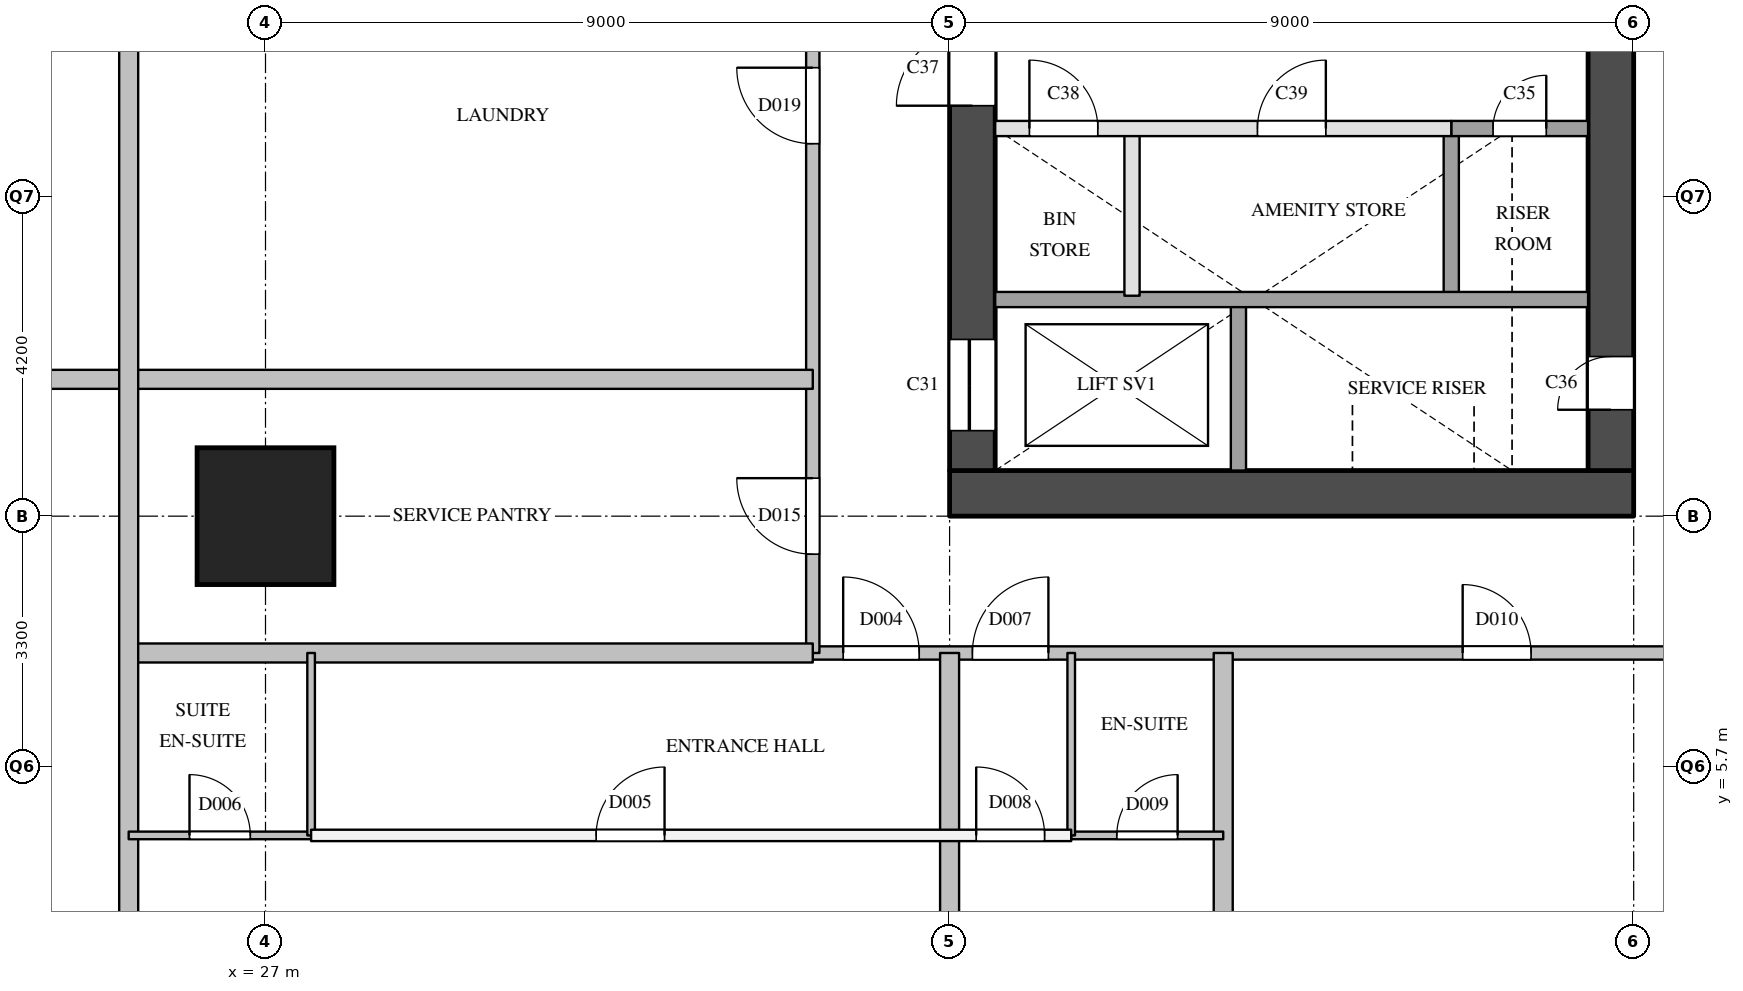
"""IFC4 building model, lengths in metres.
Left out: names, types, materials, properties, quantities, classifications, styles, units other than length and angle.
Written with IfcOpenShell. Run it as: python <this file> out.ifc"""

import sys

from ifc_helpers import new_model, si_unit, direction, frame, frame_2d, origin, origin_2d, place, context, subcontext, project, spatial, rectangle, extrude, element, fill, save


model = new_model("IFC4")
c1 = context("Model", 3, precision=1e-05, world=origin(), true_north=direction((0.0, 1.0)))
c2 = subcontext(c1, "Body", "Model", "MODEL_VIEW")
j1 = project(units=[si_unit("LENGTHUNIT", "METRE"), si_unit("PLANEANGLEUNIT", "RADIAN")], contexts=[c1])
p1 = place(None, origin())
s1 = spatial("IfcSite", under=j1, at=p1, CompositionType="ELEMENT")
p2 = place(p1, origin())
s2 = spatial("IfcBuilding", under=s1, at=p2, CompositionType="ELEMENT")
p3 = place(p2, frame((0.0, 0.0, 57.6)))
s3 = spatial("IfcBuildingStorey", under=s2, at=p3, CompositionType="ELEMENT", Elevation=57.6)
p4 = place(p3, frame((27.0, 9.0, 0.0), z_axis=(0.0, 0.0, 1.0), x_axis=(1.0, 0.0, 0.0)))
e1 = element("IfcColumn", 1, at=p4, inside=s3, PredefinedType="COLUMN", context=c2, shape_type="SweptSolid", body=[
    extrude(rectangle(XDim=1.8, YDim=1.8, at=origin_2d()), origin(), (0.0, 0.0, 1.0), 3.8),
])
p5 = place(p3, frame((36.0, 9.3, 0.0), z_axis=(0.0, 0.0, 1.0), x_axis=(1.0, 0.0, 0.0)))
e2 = element("IfcWall", 2, at=p5, inside=s3, PredefinedType="SHEAR", context=c2, shape_type="SweptSolid", body=[
    extrude(rectangle(XDim=9.0, YDim=0.6, at=frame_2d((4.5, 0.0))), origin(), (0.0, 0.0, 1.0), 3.5),
])
p6 = place(p3, frame((36.3, 9.6, 0.0), z_axis=(0.0, 0.0, 1.0), x_axis=(0.0, 1.0, 0.0)))
e3 = element("IfcWall", 3, at=p6, inside=s3, PredefinedType="SHEAR", context=c2, shape_type="SweptSolid", body=[
    extrude(rectangle(XDim=12.3, YDim=0.6, at=frame_2d((6.15, 0.0))), origin(), (0.0, 0.0, 1.0), 3.5),
])
p7 = place(p6, frame((0.525, 0.0, 0.0)))
e4 = element("IfcOpeningElement", 4, at=p7, cuts=e3, PredefinedType="OPENING", context=c2, shape_type="SweptSolid", body=[
    extrude(rectangle(XDim=1.2, YDim=2.1, at=frame_2d((0.6, 1.05))), frame((0.0, 0.31, 0.0), z_axis=(0.0, -1.0, 0.0), x_axis=(1.0, 0.0, 0.0)), (0.0, 0.0, 1.0), 0.62),
])
p8 = place(p6, frame((4.8, 0.0, 0.0)))
e5 = element("IfcOpeningElement", 5, at=p8, cuts=e3, PredefinedType="OPENING", context=c2, shape_type="SweptSolid", body=[
    extrude(rectangle(XDim=1.0, YDim=2.1, at=frame_2d((0.5, 1.05))), frame((0.0, 0.31, 0.0), z_axis=(0.0, -1.0, 0.0), x_axis=(1.0, 0.0, 0.0)), (0.0, 0.0, 1.0), 0.62),
])
p9 = place(p3, frame((44.7, 9.6, 0.0), z_axis=(0.0, 0.0, 1.0), x_axis=(0.0, 1.0, 0.0)))
e6 = element("IfcWall", 6, at=p9, inside=s3, PredefinedType="SHEAR", context=c2, shape_type="SweptSolid", body=[
    extrude(rectangle(XDim=12.3, YDim=0.6, at=frame_2d((6.15, 0.0))), origin(), (0.0, 0.0, 1.0), 3.5),
])
p10 = place(p9, frame((0.8, 0.0, 0.0)))
e7 = element("IfcOpeningElement", 7, at=p10, cuts=e6, PredefinedType="OPENING", context=c2, shape_type="SweptSolid", body=[
    extrude(rectangle(XDim=0.7, YDim=2.1, at=frame_2d((0.35, 1.05))), frame((0.0, 0.31, 0.0), z_axis=(0.0, -1.0, 0.0), x_axis=(1.0, 0.0, 0.0)), (0.0, 0.0, 1.0), 0.62),
])
p11 = place(p3, frame((38.4, 11.9, 0.0), z_axis=(0.0, 0.0, 1.0), x_axis=(0.0, 1.0, 0.0)))
e8 = element("IfcWall", 8, at=p11, inside=s3, PredefinedType="PARTITIONING", context=c2, shape_type="SweptSolid", body=[
    extrude(rectangle(XDim=2.2, YDim=0.2, at=frame_2d((1.1, 0.0))), origin(), (0.0, 0.0, 1.0), 3.5),
])
p12 = place(p3, frame((39.8, 9.6, 0.0), z_axis=(0.0, 0.0, 1.0), x_axis=(0.0, 1.0, 0.0)))
e9 = element("IfcWall", 9, at=p12, inside=s3, PredefinedType="SOLIDWALL", context=c2, shape_type="SweptSolid", body=[
    extrude(rectangle(XDim=2.3, YDim=0.2, at=frame_2d((1.15, 0.0))), origin(), (0.0, 0.0, 1.0), 3.5),
])
p13 = place(p3, frame((42.6, 11.9, 0.0), z_axis=(0.0, 0.0, 1.0), x_axis=(0.0, 1.0, 0.0)))
e10 = element("IfcWall", 10, at=p13, inside=s3, PredefinedType="SOLIDWALL", context=c2, shape_type="SweptSolid", body=[
    extrude(rectangle(XDim=2.2, YDim=0.2, at=frame_2d((1.1, 0.0))), origin(), (0.0, 0.0, 1.0), 3.5),
])
p14 = place(p3, frame((36.6, 11.85, 0.0), z_axis=(0.0, 0.0, 1.0), x_axis=(1.0, 0.0, 0.0)))
e11 = element("IfcWall", 11, at=p14, inside=s3, PredefinedType="SOLIDWALL", context=c2, shape_type="SweptSolid", body=[
    extrude(rectangle(XDim=7.8, YDim=0.2, at=frame_2d((3.9, 0.0))), origin(), (0.0, 0.0, 1.0), 3.5),
])
p15 = place(p3, frame((36.6, 14.1, 0.0), z_axis=(0.0, 0.0, 1.0), x_axis=(1.0, 0.0, 0.0)))
e12 = element("IfcWall", 12, at=p15, inside=s3, PredefinedType="PARTITIONING", context=c2, shape_type="SweptSolid", body=[
    extrude(rectangle(XDim=6.0, YDim=0.2, at=frame_2d((3.0, 0.0))), origin(), (0.0, 0.0, 1.0), 3.5),
])
p16 = place(p15, frame((0.45, 0.0, 0.0)))
e13 = element("IfcOpeningElement", 13, at=p16, cuts=e12, PredefinedType="OPENING", context=c2, shape_type="SweptSolid", body=[
    extrude(rectangle(XDim=0.9, YDim=2.1, at=frame_2d((0.45, 1.05))), frame((0.0, 0.11, 0.0), z_axis=(0.0, -1.0, 0.0), x_axis=(1.0, 0.0, 0.0)), (0.0, 0.0, 1.0), 0.22),
])
p17 = place(p15, frame((3.45, 0.0, 0.0)))
e14 = element("IfcOpeningElement", 14, at=p17, cuts=e12, PredefinedType="OPENING", context=c2, shape_type="SweptSolid", body=[
    extrude(rectangle(XDim=0.9, YDim=2.1, at=frame_2d((0.45, 1.05))), frame((0.0, 0.11, 0.0), z_axis=(0.0, -1.0, 0.0), x_axis=(1.0, 0.0, 0.0)), (0.0, 0.0, 1.0), 0.22),
])
p18 = place(p3, frame((42.6, 14.1, 0.0), z_axis=(0.0, 0.0, 1.0), x_axis=(1.0, 0.0, 0.0)))
e15 = element("IfcWall", 15, at=p18, inside=s3, PredefinedType="SOLIDWALL", context=c2, shape_type="SweptSolid", body=[
    extrude(rectangle(XDim=1.8, YDim=0.2, at=frame_2d((0.9, 0.0))), origin(), (0.0, 0.0, 1.0), 3.5),
])
p19 = place(p18, frame((0.55, 0.0, 0.0)))
e16 = element("IfcOpeningElement", 16, at=p19, cuts=e15, PredefinedType="OPENING", context=c2, shape_type="SweptSolid", body=[
    extrude(rectangle(XDim=0.7, YDim=2.1, at=frame_2d((0.35, 1.05))), frame((0.0, 0.11, 0.0), z_axis=(0.0, -1.0, 0.0), x_axis=(1.0, 0.0, 0.0)), (0.0, 0.0, 1.0), 0.22),
])
p20 = place(p3, frame((34.2, 7.2, 0.0), z_axis=(0.0, 0.0, 1.0), x_axis=(1.0, 0.0, 0.0)))
e17 = element("IfcWall", 17, at=p20, inside=s3, PredefinedType="PARTITIONING", context=c2, shape_type="SweptSolid", body=[
    extrude(rectangle(XDim=12.6, YDim=0.175, at=frame_2d((6.3, 0.0))), origin(), (0.0, 0.0, 1.0), 3.5),
])
p21 = place(p20, frame((0.4, 0.0, 0.0)))
e18 = element("IfcOpeningElement", 18, at=p21, cuts=e17, PredefinedType="OPENING", context=c2, shape_type="SweptSolid", body=[
    extrude(rectangle(XDim=1.0, YDim=2.1, at=frame_2d((0.5, 1.05))), frame((0.0, 0.097, 0.0), z_axis=(0.0, -1.0, 0.0), x_axis=(1.0, 0.0, 0.0)), (0.0, 0.0, 1.0), 0.195),
])
p22 = place(p20, frame((2.1, 0.0, 0.0)))
e19 = element("IfcOpeningElement", 19, at=p22, cuts=e17, PredefinedType="OPENING", context=c2, shape_type="SweptSolid", body=[
    extrude(rectangle(XDim=1.0, YDim=2.1, at=frame_2d((0.5, 1.05))), frame((0.0, 0.097, 0.0), z_axis=(0.0, -1.0, 0.0), x_axis=(1.0, 0.0, 0.0)), (0.0, 0.0, 1.0), 0.195),
])
p23 = place(p20, frame((8.55, 0.0, 0.0)))
e20 = element("IfcOpeningElement", 20, at=p23, cuts=e17, PredefinedType="OPENING", context=c2, shape_type="SweptSolid", body=[
    extrude(rectangle(XDim=0.9, YDim=2.1, at=frame_2d((0.45, 1.05))), frame((0.0, 0.097, 0.0), z_axis=(0.0, -1.0, 0.0), x_axis=(1.0, 0.0, 0.0)), (0.0, 0.0, 1.0), 0.195),
])
p24 = place(p3, frame((34.2, 7.2, 0.0), z_axis=(0.0, 0.0, 1.0), x_axis=(0.0, 1.0, 0.0)))
e21 = element("IfcWall", 21, at=p24, inside=s3, PredefinedType="PARTITIONING", context=c2, shape_type="SweptSolid", body=[
    extrude(rectangle(XDim=16.49, YDim=0.175, at=frame_2d((8.245, 0.0))), origin(), (0.0, 0.0, 1.0), 3.5),
])
p25 = place(p24, frame((1.3, 0.0, 0.0)))
e22 = element("IfcOpeningElement", 22, at=p25, cuts=e21, PredefinedType="OPENING", context=c2, shape_type="SweptSolid", body=[
    extrude(rectangle(XDim=1.0, YDim=2.1, at=frame_2d((0.5, 1.05))), frame((0.0, 0.097, 0.0), z_axis=(0.0, -1.0, 0.0), x_axis=(1.0, 0.0, 0.0)), (0.0, 0.0, 1.0), 0.195),
])
p26 = place(p24, frame((6.7, 0.0, 0.0)))
e23 = element("IfcOpeningElement", 23, at=p26, cuts=e21, PredefinedType="OPENING", context=c2, shape_type="SweptSolid", body=[
    extrude(rectangle(XDim=1.0, YDim=2.1, at=frame_2d((0.5, 1.05))), frame((0.0, 0.097, 0.0), z_axis=(0.0, -1.0, 0.0), x_axis=(1.0, 0.0, 0.0)), (0.0, 0.0, 1.0), 0.195),
])
p27 = place(p24, frame((12.1, 0.0, 0.0)))
e24 = element("IfcOpeningElement", 24, at=p27, cuts=e21, PredefinedType="OPENING", context=c2, shape_type="SweptSolid", body=[
    extrude(rectangle(XDim=1.0, YDim=2.1, at=frame_2d((0.5, 1.05))), frame((0.0, 0.097, 0.0), z_axis=(0.0, -1.0, 0.0), x_axis=(1.0, 0.0, 0.0)), (0.0, 0.0, 1.0), 0.195),
])
p28 = place(p3, frame((27.6, 4.8, 0.0), z_axis=(0.0, 0.0, 1.0), x_axis=(1.0, 0.0, 0.0)))
e25 = element("IfcWall", 25, at=p28, inside=s3, PredefinedType="PARTITIONING", context=c2, shape_type="SweptSolid", body=[
    extrude(rectangle(XDim=10.0, YDim=0.15, at=frame_2d((5.0, 0.0))), origin(), (0.0, 0.0, 1.0), 3.5),
])
p29 = place(p28, frame((3.75, 0.0, 0.0)))
e26 = element("IfcOpeningElement", 26, at=p29, cuts=e25, PredefinedType="OPENING", context=c2, shape_type="SweptSolid", body=[
    extrude(rectangle(XDim=0.9, YDim=2.1, at=frame_2d((0.45, 1.05))), frame((0.0, 0.085, 0.0), z_axis=(0.0, -1.0, 0.0), x_axis=(1.0, 0.0, 0.0)), (0.0, 0.0, 1.0), 0.17),
])
p30 = place(p28, frame((8.75, 0.0, 0.0)))
e27 = element("IfcOpeningElement", 27, at=p30, cuts=e25, PredefinedType="OPENING", context=c2, shape_type="SweptSolid", body=[
    extrude(rectangle(XDim=0.9, YDim=2.1, at=frame_2d((0.45, 1.05))), frame((0.0, 0.085, 0.0), z_axis=(0.0, -1.0, 0.0), x_axis=(1.0, 0.0, 0.0)), (0.0, 0.0, 1.0), 0.17),
])
p31 = place(p3, frame((25.2, 7.2, 0.0), z_axis=(0.0, 0.0, 1.0), x_axis=(1.0, 0.0, 0.0)))
e28 = element("IfcWall", 28, at=p31, inside=s3, PredefinedType="PARTITIONING", context=c2, shape_type="SweptSolid", body=[
    extrude(rectangle(XDim=9.0, YDim=0.25, at=frame_2d((4.5, 0.0))), origin(), (0.0, 0.0, 1.0), 2.5),
])
p32 = place(p3, frame((19.8, 10.8, 0.0), z_axis=(0.0, 0.0, 1.0), x_axis=(1.0, 0.0, 0.0)))
e29 = element("IfcWall", 29, at=p32, inside=s3, PredefinedType="PARTITIONING", context=c2, shape_type="SweptSolid", body=[
    extrude(rectangle(XDim=14.4, YDim=0.25, at=frame_2d((7.2, 0.0))), origin(), (0.0, 0.0, 1.0), 2.5),
])
p33 = place(p3, frame((25.2, 0.0, 0.0), z_axis=(0.0, 0.0, 1.0), x_axis=(0.0, 1.0, 0.0)))
e30 = element("IfcWall", 30, at=p33, inside=s3, PredefinedType="PARTITIONING", context=c2, shape_type="SweptSolid", body=[
    extrude(rectangle(XDim=21.6, YDim=0.25, at=frame_2d((10.8, 0.0))), origin(), (0.0, 0.0, 1.0), 2.5),
])
p34 = place(p3, frame((36.0, 0.0, 0.0), z_axis=(0.0, 0.0, 1.0), x_axis=(0.0, 1.0, 0.0)))
e31 = element("IfcWall", 31, at=p34, inside=s3, PredefinedType="PARTITIONING", context=c2, shape_type="SweptSolid", body=[
    extrude(rectangle(XDim=7.2, YDim=0.25, at=frame_2d((3.6, 0.0))), origin(), (0.0, 0.0, 1.0), 3.5),
])
p35 = place(p3, frame((39.6, 0.0, 0.0), z_axis=(0.0, 0.0, 1.0), x_axis=(0.0, 1.0, 0.0)))
e32 = element("IfcWall", 32, at=p35, inside=s3, PredefinedType="PARTITIONING", context=c2, shape_type="SweptSolid", body=[
    extrude(rectangle(XDim=7.2, YDim=0.25, at=frame_2d((3.6, 0.0))), origin(), (0.0, 0.0, 1.0), 2.5),
])
p36 = place(p3, frame((25.2, 4.8, 0.0), z_axis=(0.0, 0.0, 1.0), x_axis=(1.0, 0.0, 0.0)))
e33 = element("IfcWall", 33, at=p36, inside=s3, PredefinedType="PARTITIONING", context=c2, shape_type="SweptSolid", body=[
    extrude(rectangle(XDim=2.4, YDim=0.1, at=frame_2d((1.2, 0.0))), origin(), (0.0, 0.0, 1.0), 2.5),
])
p37 = place(p36, frame((0.8, 0.0, 0.0)))
e34 = element("IfcOpeningElement", 34, at=p37, cuts=e33, PredefinedType="OPENING", context=c2, shape_type="SweptSolid", body=[
    extrude(rectangle(XDim=0.8, YDim=2.1, at=frame_2d((0.4, 1.05))), frame((0.0, 0.06, 0.0), z_axis=(0.0, -1.0, 0.0), x_axis=(1.0, 0.0, 0.0)), (0.0, 0.0, 1.0), 0.12),
])
p38 = place(p3, frame((37.6, 4.8, 0.0), z_axis=(0.0, 0.0, 1.0), x_axis=(1.0, 0.0, 0.0)))
e35 = element("IfcWall", 35, at=p38, inside=s3, PredefinedType="PARTITIONING", context=c2, shape_type="SweptSolid", body=[
    extrude(rectangle(XDim=2.0, YDim=0.1, at=frame_2d((1.0, 0.0))), origin(), (0.0, 0.0, 1.0), 3.5),
])
p39 = place(p38, frame((0.6, 0.0, 0.0)))
e36 = element("IfcOpeningElement", 36, at=p39, cuts=e35, PredefinedType="OPENING", context=c2, shape_type="SweptSolid", body=[
    extrude(rectangle(XDim=0.8, YDim=2.1, at=frame_2d((0.4, 1.05))), frame((0.0, 0.06, 0.0), z_axis=(0.0, -1.0, 0.0), x_axis=(1.0, 0.0, 0.0)), (0.0, 0.0, 1.0), 0.12),
])
for number, where, z_axis, x_axis in (
    (37, (27.6, 4.8, 0.0), (0.0, 0.0, 1.0), (0.0, 1.0, 0.0)),
    (38, (37.6, 4.8, 0.0), (0.0, 0.0, 1.0), (0.0, 1.0, 0.0)),
):
    element("IfcWall", number, at=place(p3, frame(where, z_axis=z_axis, x_axis=x_axis)), inside=s3, PredefinedType="PARTITIONING", context=c2, shape_type="SweptSolid", body=[
        extrude(rectangle(XDim=2.4, YDim=0.1, at=frame_2d((1.2, 0.0))), origin(), (0.0, 0.0, 1.0), 3.5),
    ])
p40 = place(p7, origin())
e39 = element("IfcDoor", 39, at=p40, inside=s3, OperationType="SLIDING_TO_LEFT", PredefinedType="DOOR", context=c2, shape_type="SweptSolid", body=[
    extrude(rectangle(XDim=1.2, YDim=2.1, at=frame_2d((0.6, 1.05))), frame((0.0, 0.025, 0.0), z_axis=(0.0, -1.0, 0.0), x_axis=(1.0, 0.0, 0.0)), (0.0, 0.0, 1.0), 0.05),
])
fill(e4, e39)
p41 = place(p19, origin())
e40 = element("IfcDoor", 40, at=p41, inside=s3, OperationType="SINGLE_SWING_RIGHT", PredefinedType="DOOR", context=c2, shape_type="SweptSolid", body=[
    extrude(rectangle(XDim=0.7, YDim=2.1, at=frame_2d((0.35, 1.05))), frame((0.0, 0.025, 0.0), z_axis=(0.0, -1.0, 0.0), x_axis=(1.0, 0.0, 0.0)), (0.0, 0.0, 1.0), 0.05),
])
fill(e16, e40)
p42 = place(p10, origin())
e41 = element("IfcDoor", 41, at=p42, inside=s3, OperationType="SINGLE_SWING_LEFT", PredefinedType="DOOR", context=c2, shape_type="SweptSolid", body=[
    extrude(rectangle(XDim=0.7, YDim=2.1, at=frame_2d((0.35, 1.05))), frame((0.0, 0.025, 0.0), z_axis=(0.0, -1.0, 0.0), x_axis=(1.0, 0.0, 0.0)), (0.0, 0.0, 1.0), 0.05),
])
fill(e7, e41)
p43 = place(p8, origin())
e42 = element("IfcDoor", 42, at=p43, inside=s3, OperationType="SINGLE_SWING_LEFT", PredefinedType="DOOR", context=c2, shape_type="SweptSolid", body=[
    extrude(rectangle(XDim=1.0, YDim=2.1, at=frame_2d((0.5, 1.05))), frame((0.0, 0.025, 0.0), z_axis=(0.0, -1.0, 0.0), x_axis=(1.0, 0.0, 0.0)), (0.0, 0.0, 1.0), 0.05),
])
fill(e5, e42)
p44 = place(p16, origin())
e43 = element("IfcDoor", 43, at=p44, inside=s3, OperationType="SINGLE_SWING_LEFT", PredefinedType="DOOR", context=c2, shape_type="SweptSolid", body=[
    extrude(rectangle(XDim=0.9, YDim=2.1, at=frame_2d((0.45, 1.05))), frame((0.0, 0.025, 0.0), z_axis=(0.0, -1.0, 0.0), x_axis=(1.0, 0.0, 0.0)), (0.0, 0.0, 1.0), 0.05),
])
fill(e13, e43)
p45 = place(p17, origin())
e44 = element("IfcDoor", 44, at=p45, inside=s3, OperationType="SINGLE_SWING_RIGHT", PredefinedType="DOOR", context=c2, shape_type="SweptSolid", body=[
    extrude(rectangle(XDim=0.9, YDim=2.1, at=frame_2d((0.45, 1.05))), frame((0.0, 0.025, 0.0), z_axis=(0.0, -1.0, 0.0), x_axis=(1.0, 0.0, 0.0)), (0.0, 0.0, 1.0), 0.05),
])
fill(e14, e44)
p46 = place(p21, origin())
e45 = element("IfcDoor", 45, at=p46, inside=s3, OperationType="SINGLE_SWING_LEFT", PredefinedType="DOOR", context=c2, shape_type="SweptSolid", body=[
    extrude(rectangle(XDim=1.0, YDim=2.1, at=frame_2d((0.5, 1.05))), frame((0.0, 0.025, 0.0), z_axis=(0.0, -1.0, 0.0), x_axis=(1.0, 0.0, 0.0)), (0.0, 0.0, 1.0), 0.05),
])
fill(e18, e45)
p47 = place(p29, origin())
e46 = element("IfcDoor", 46, at=p47, inside=s3, OperationType="SINGLE_SWING_RIGHT", PredefinedType="DOOR", context=c2, shape_type="SweptSolid", body=[
    extrude(rectangle(XDim=0.9, YDim=2.1, at=frame_2d((0.45, 1.05))), frame((0.0, 0.025, 0.0), z_axis=(0.0, -1.0, 0.0), x_axis=(1.0, 0.0, 0.0)), (0.0, 0.0, 1.0), 0.05),
])
fill(e26, e46)
p48 = place(p37, origin())
e47 = element("IfcDoor", 47, at=p48, inside=s3, OperationType="SINGLE_SWING_LEFT", PredefinedType="DOOR", context=c2, shape_type="SweptSolid", body=[
    extrude(rectangle(XDim=0.8, YDim=2.1, at=frame_2d((0.4, 1.05))), frame((0.0, 0.025, 0.0), z_axis=(0.0, -1.0, 0.0), x_axis=(1.0, 0.0, 0.0)), (0.0, 0.0, 1.0), 0.05),
])
fill(e34, e47)
p49 = place(p22, origin())
e48 = element("IfcDoor", 48, at=p49, inside=s3, OperationType="SINGLE_SWING_RIGHT", PredefinedType="DOOR", context=c2, shape_type="SweptSolid", body=[
    extrude(rectangle(XDim=1.0, YDim=2.1, at=frame_2d((0.5, 1.05))), frame((0.0, 0.025, 0.0), z_axis=(0.0, -1.0, 0.0), x_axis=(1.0, 0.0, 0.0)), (0.0, 0.0, 1.0), 0.05),
])
fill(e19, e48)
p50 = place(p30, origin())
e49 = element("IfcDoor", 49, at=p50, inside=s3, OperationType="SINGLE_SWING_LEFT", PredefinedType="DOOR", context=c2, shape_type="SweptSolid", body=[
    extrude(rectangle(XDim=0.9, YDim=2.1, at=frame_2d((0.45, 1.05))), frame((0.0, 0.025, 0.0), z_axis=(0.0, -1.0, 0.0), x_axis=(1.0, 0.0, 0.0)), (0.0, 0.0, 1.0), 0.05),
])
fill(e27, e49)
p51 = place(p39, origin())
e50 = element("IfcDoor", 50, at=p51, inside=s3, OperationType="SINGLE_SWING_RIGHT", PredefinedType="DOOR", context=c2, shape_type="SweptSolid", body=[
    extrude(rectangle(XDim=0.8, YDim=2.1, at=frame_2d((0.4, 1.05))), frame((0.0, 0.025, 0.0), z_axis=(0.0, -1.0, 0.0), x_axis=(1.0, 0.0, 0.0)), (0.0, 0.0, 1.0), 0.05),
])
fill(e36, e50)
p52 = place(p23, origin())
e51 = element("IfcDoor", 51, at=p52, inside=s3, OperationType="SINGLE_SWING_LEFT", PredefinedType="DOOR", context=c2, shape_type="SweptSolid", body=[
    extrude(rectangle(XDim=0.9, YDim=2.1, at=frame_2d((0.45, 1.05))), frame((0.0, 0.025, 0.0), z_axis=(0.0, -1.0, 0.0), x_axis=(1.0, 0.0, 0.0)), (0.0, 0.0, 1.0), 0.05),
])
fill(e20, e51)
p53 = place(p25, origin())
e52 = element("IfcDoor", 52, at=p53, inside=s3, OperationType="SINGLE_SWING_RIGHT", PredefinedType="DOOR", context=c2, shape_type="SweptSolid", body=[
    extrude(rectangle(XDim=1.0, YDim=2.1, at=frame_2d((0.5, 1.05))), frame((0.0, 0.025, 0.0), z_axis=(0.0, -1.0, 0.0), x_axis=(1.0, 0.0, 0.0)), (0.0, 0.0, 1.0), 0.05),
])
fill(e22, e52)
p54 = place(p26, origin())
e53 = element("IfcDoor", 53, at=p54, inside=s3, OperationType="SINGLE_SWING_RIGHT", PredefinedType="DOOR", context=c2, shape_type="SweptSolid", body=[
    extrude(rectangle(XDim=1.0, YDim=2.1, at=frame_2d((0.5, 1.05))), frame((0.0, 0.025, 0.0), z_axis=(0.0, -1.0, 0.0), x_axis=(1.0, 0.0, 0.0)), (0.0, 0.0, 1.0), 0.05),
])
fill(e23, e53)
save(model, sys.argv[1])
